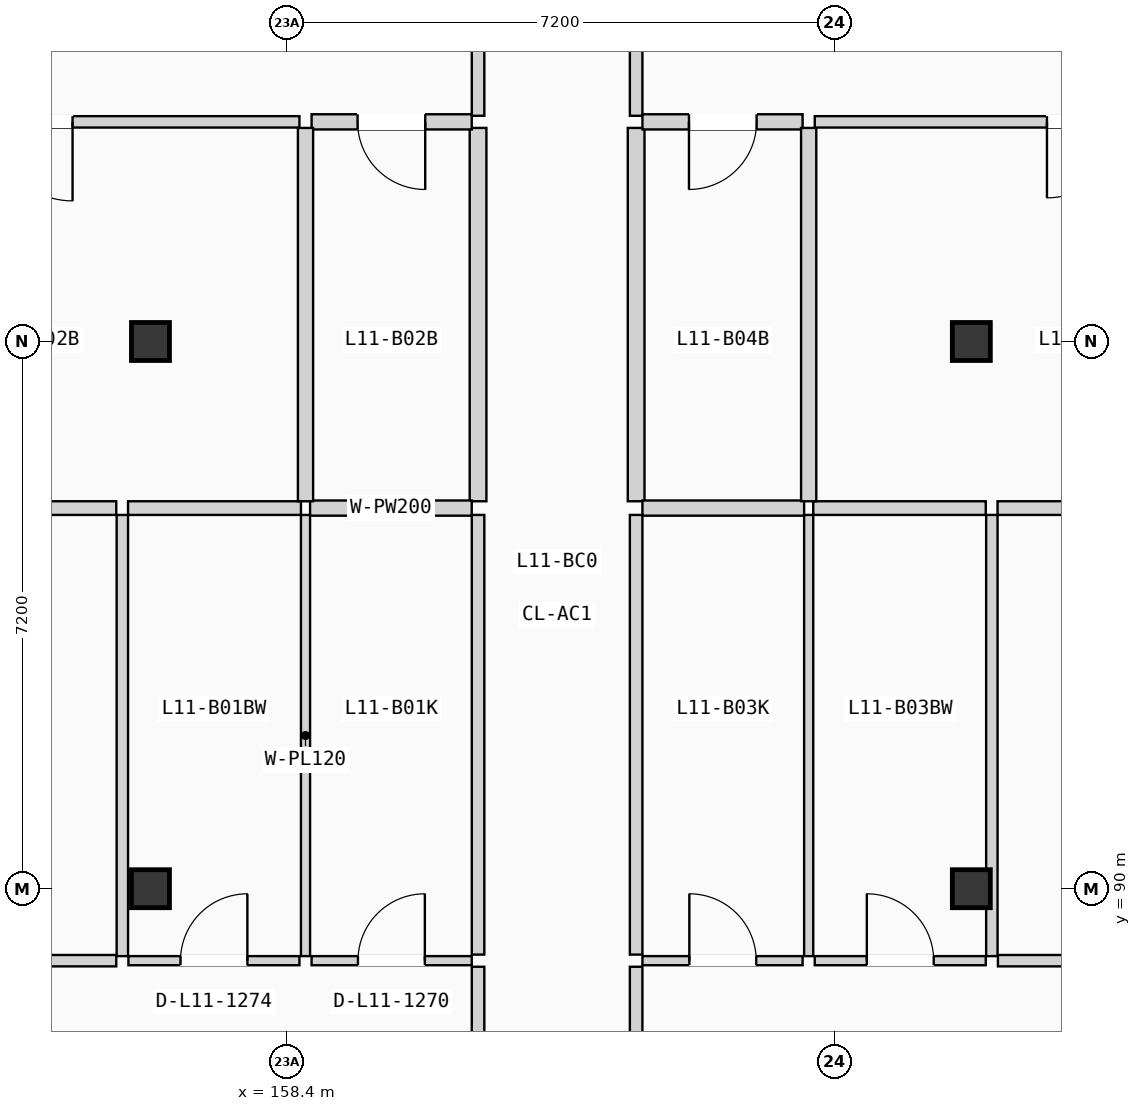
"""IFC4 building model, lengths in metres.
Left out: names, types, materials, properties, quantities, classifications, styles, units other than length and angle.
Written with IfcOpenShell. Run it as: python <this file> out.ifc"""

import sys

from ifc_helpers import new_model, si_unit, direction, frame, frame_2d, origin, origin_2d, place, context, subcontext, project, spatial, rectangle, extrude, element, fill, save


model = new_model("IFC4")
c1 = context("Model", 3, precision=1e-05, world=origin(), true_north=direction((0.0, 1.0)))
c2 = subcontext(c1, "Body", "Model", "MODEL_VIEW")
j1 = project(units=[si_unit("LENGTHUNIT", "METRE"), si_unit("PLANEANGLEUNIT", "RADIAN")], contexts=[c1])
p1 = place(None, origin())
s1 = spatial("IfcSite", under=j1, at=p1, CompositionType="ELEMENT")
p2 = place(p1, origin())
s2 = spatial("IfcBuilding", under=s1, at=p2, CompositionType="ELEMENT")
p3 = place(p2, frame((0.0, 0.0, 37.275)))
s3 = spatial("IfcBuildingStorey", under=s2, at=p3, CompositionType="ELEMENT", Elevation=37.275)
for number, where, z_axis, x_axis in (
    (1, (156.6, 90.0, 0.0), (0.0, 0.0, 1.0), (1.0, 0.0, 0.0)),
    (2, (156.6, 97.2, 0.0), (0.0, 0.0, 1.0), (1.0, 0.0, 0.0)),
    (3, (167.4, 90.0, 0.0), (0.0, 0.0, 1.0), (1.0, 0.0, 0.0)),
    (4, (167.4, 97.2, 0.0), (0.0, 0.0, 1.0), (1.0, 0.0, 0.0)),
):
    element("IfcColumn", number, at=place(p3, frame(where, z_axis=z_axis, x_axis=x_axis)), inside=s3, PredefinedType="COLUMN", context=c2, shape_type="SweptSolid", body=[
        extrude(rectangle(XDim=0.5, YDim=0.5, at=origin_2d()), origin(), (0.0, 0.0, 1.0), 3.15),
    ])
p4 = place(p3, frame((160.91, 81.945, 0.0), z_axis=(0.0, 0.0, 1.0), x_axis=(0.0, 1.0, 0.0)))
e5 = element("IfcWall", 5, at=p4, inside=s3, PredefinedType="PARTITIONING", context=c2, shape_type="SweptSolid", body=[
    extrude(rectangle(XDim=7.028, YDim=0.165, at=frame_2d((3.514, 0.0))), origin(), (0.0, 0.0, 1.0), 2.87),
])
p5 = place(p4, frame((3.024, 0.0, 0.0)))
e6 = element("IfcOpeningElement", 6, at=p5, cuts=e5, PredefinedType="OPENING", context=c2, shape_type="SweptSolid", body=[
    extrude(rectangle(XDim=0.98, YDim=2.08, at=frame_2d((0.49, 1.04))), frame((0.0, 0.093, 0.0), z_axis=(0.0, -1.0, 0.0), x_axis=(1.0, 0.0, 0.0)), (0.0, 0.0, 1.0), 0.185),
])
p6 = place(p3, frame((160.91, 89.133, 0.0), z_axis=(0.0, 0.0, 1.0), x_axis=(0.0, 1.0, 0.0)))
e7 = element("IfcWall", 7, at=p6, inside=s3, PredefinedType="PARTITIONING", context=c2, shape_type="SweptSolid", body=[
    extrude(rectangle(XDim=5.785, YDim=0.165, at=frame_2d((2.893, 0.0))), origin(), (0.0, 0.0, 1.0), 2.87),
])
p7 = place(p3, frame((160.91, 100.17, 0.0), z_axis=(0.0, 0.0, 1.0), x_axis=(0.0, 1.0, 0.0)))
e8 = element("IfcWall", 8, at=p7, inside=s3, PredefinedType="PARTITIONING", context=c2, shape_type="SweptSolid", body=[
    extrude(rectangle(XDim=5.958, YDim=0.165, at=frame_2d((2.979, 0.0))), origin(), (0.0, 0.0, 1.0), 2.87),
])
p8 = place(p7, frame((2.489, 0.0, 0.0)))
e9 = element("IfcOpeningElement", 9, at=p8, cuts=e8, PredefinedType="OPENING", context=c2, shape_type="SweptSolid", body=[
    extrude(rectangle(XDim=0.98, YDim=2.08, at=frame_2d((0.49, 1.04))), frame((0.0, 0.093, 0.0), z_axis=(0.0, -1.0, 0.0), x_axis=(1.0, 0.0, 0.0)), (0.0, 0.0, 1.0), 0.185),
])
p9 = place(p3, frame((160.91, 95.098, 0.0), z_axis=(0.0, 0.0, 1.0), x_axis=(0.0, 1.0, 0.0)))
e10 = element("IfcWall", 10, at=p9, inside=s3, PredefinedType="PLUMBINGWALL", context=c2, shape_type="SweptSolid", body=[
    extrude(rectangle(XDim=4.912, YDim=0.22, at=frame_2d((2.456, 0.0))), origin(), (0.0, 0.0, 1.0), 2.87),
])
p10 = place(p3, frame((162.99, 81.945, 0.0), z_axis=(0.0, 0.0, 1.0), x_axis=(0.0, 1.0, 0.0)))
e11 = element("IfcWall", 11, at=p10, inside=s3, PredefinedType="PARTITIONING", context=c2, shape_type="SweptSolid", body=[
    extrude(rectangle(XDim=7.028, YDim=0.165, at=frame_2d((3.514, 0.0))), origin(), (0.0, 0.0, 1.0), 2.87),
])
p11 = place(p10, frame((3.024, 0.0, 0.0)))
e12 = element("IfcOpeningElement", 12, at=p11, cuts=e11, PredefinedType="OPENING", context=c2, shape_type="SweptSolid", body=[
    extrude(rectangle(XDim=0.98, YDim=2.08, at=frame_2d((0.49, 1.04))), frame((0.0, 0.093, 0.0), z_axis=(0.0, -1.0, 0.0), x_axis=(1.0, 0.0, 0.0)), (0.0, 0.0, 1.0), 0.185),
])
p12 = place(p3, frame((162.99, 89.133, 0.0), z_axis=(0.0, 0.0, 1.0), x_axis=(0.0, 1.0, 0.0)))
e13 = element("IfcWall", 13, at=p12, inside=s3, PredefinedType="PARTITIONING", context=c2, shape_type="SweptSolid", body=[
    extrude(rectangle(XDim=5.785, YDim=0.165, at=frame_2d((2.893, 0.0))), origin(), (0.0, 0.0, 1.0), 2.87),
])
p13 = place(p3, frame((162.99, 100.17, 0.0), z_axis=(0.0, 0.0, 1.0), x_axis=(0.0, 1.0, 0.0)))
e14 = element("IfcWall", 14, at=p13, inside=s3, PredefinedType="PARTITIONING", context=c2, shape_type="SweptSolid", body=[
    extrude(rectangle(XDim=5.958, YDim=0.165, at=frame_2d((2.979, 0.0))), origin(), (0.0, 0.0, 1.0), 2.87),
])
p14 = place(p13, frame((2.489, 0.0, 0.0)))
e15 = element("IfcOpeningElement", 15, at=p14, cuts=e14, PredefinedType="OPENING", context=c2, shape_type="SweptSolid", body=[
    extrude(rectangle(XDim=0.98, YDim=2.08, at=frame_2d((0.49, 1.04))), frame((0.0, 0.093, 0.0), z_axis=(0.0, -1.0, 0.0), x_axis=(1.0, 0.0, 0.0)), (0.0, 0.0, 1.0), 0.185),
])
p15 = place(p3, frame((162.99, 95.098, 0.0), z_axis=(0.0, 0.0, 1.0), x_axis=(0.0, 1.0, 0.0)))
e16 = element("IfcWall", 16, at=p15, inside=s3, PredefinedType="PLUMBINGWALL", context=c2, shape_type="SweptSolid", body=[
    extrude(rectangle(XDim=4.912, YDim=0.22, at=frame_2d((2.456, 0.0))), origin(), (0.0, 0.0, 1.0), 2.87),
])
p16 = place(p3, frame((158.72, 89.053, 0.0), z_axis=(0.0, 0.0, 1.0), x_axis=(1.0, 0.0, 0.0)))
e17 = element("IfcWall", 17, at=p16, inside=s3, PredefinedType="PARTITIONING", context=c2, shape_type="SweptSolid", body=[
    extrude(rectangle(XDim=2.107, YDim=0.12, at=frame_2d((1.053, 0.0))), origin(), (0.0, 0.0, 1.0), 2.87),
])
p17 = place(p16, frame((0.61, 0.0, 0.0)))
e18 = element("IfcOpeningElement", 18, at=p17, cuts=e17, PredefinedType="OPENING", context=c2, shape_type="SweptSolid", body=[
    extrude(rectangle(XDim=0.88, YDim=2.02, at=frame_2d((0.44, 1.01))), frame((0.0, 0.07, 0.0), z_axis=(0.0, -1.0, 0.0), x_axis=(1.0, 0.0, 0.0)), (0.0, 0.0, 1.0), 0.14),
])
p18 = place(p3, frame((151.54, 89.053, 0.0), z_axis=(0.0, 0.0, 1.0), x_axis=(1.0, 0.0, 0.0)))
e19 = element("IfcWall", 19, at=p18, inside=s3, PredefinedType="PARTITIONING", context=c2, shape_type="SweptSolid", body=[
    extrude(rectangle(XDim=4.61, YDim=0.15, at=frame_2d((2.305, 0.0))), origin(), (0.0, 0.0, 1.0), 2.87),
])
p19 = place(p18, frame((1.84, 0.0, 0.0)))
e20 = element("IfcOpeningElement", 20, at=p19, cuts=e19, PredefinedType="OPENING", context=c2, shape_type="SweptSolid", body=[
    extrude(rectangle(XDim=0.94, YDim=2.06, at=frame_2d((0.47, 1.03))), frame((0.0, 0.085, 0.0), z_axis=(0.0, -1.0, 0.0), x_axis=(1.0, 0.0, 0.0)), (0.0, 0.0, 1.0), 0.17),
])
p20 = place(p3, frame((156.31, 89.053, 0.0), z_axis=(0.0, 0.0, 1.0), x_axis=(1.0, 0.0, 0.0)))
e21 = element("IfcWall", 21, at=p20, inside=s3, PredefinedType="PARTITIONING", context=c2, shape_type="SweptSolid", body=[
    extrude(rectangle(XDim=2.25, YDim=0.12, at=frame_2d((1.125, 0.0))), origin(), (0.0, 0.0, 1.0), 2.87),
])
p21 = place(p20, frame((0.685, 0.0, 0.0)))
e22 = element("IfcOpeningElement", 22, at=p21, cuts=e21, PredefinedType="OPENING", context=c2, shape_type="SweptSolid", body=[
    extrude(rectangle(XDim=0.88, YDim=2.02, at=frame_2d((0.44, 1.01))), frame((0.0, 0.07, 0.0), z_axis=(0.0, -1.0, 0.0), x_axis=(1.0, 0.0, 0.0)), (0.0, 0.0, 1.0), 0.14),
])
p22 = place(p3, frame((158.64, 89.113, 0.0), z_axis=(0.0, 0.0, 1.0), x_axis=(0.0, 1.0, 0.0)))
e23 = element("IfcWall", 23, at=p22, inside=s3, PredefinedType="PARTITIONING", context=c2, shape_type="SweptSolid", body=[
    extrude(rectangle(XDim=5.805, YDim=0.12, at=frame_2d((2.902, 0.0))), origin(), (0.0, 0.0, 1.0), 2.87),
])
p23 = place(p3, frame((158.7, 95.008, 0.0), z_axis=(0.0, 0.0, 1.0), x_axis=(1.0, 0.0, 0.0)))
e24 = element("IfcWall", 24, at=p23, inside=s3, PredefinedType="PLUMBINGWALL", context=c2, shape_type="SweptSolid", body=[
    extrude(rectangle(XDim=2.127, YDim=0.2, at=frame_2d((1.063, 0.0))), origin(), (0.0, 0.0, 1.0), 2.87),
])
p24 = place(p3, frame((156.23, 89.113, 0.0), z_axis=(0.0, 0.0, 1.0), x_axis=(0.0, 1.0, 0.0)))
e25 = element("IfcWall", 25, at=p24, inside=s3, PredefinedType="PARTITIONING", context=c2, shape_type="SweptSolid", body=[
    extrude(rectangle(XDim=5.805, YDim=0.15, at=frame_2d((2.902, 0.0))), origin(), (0.0, 0.0, 1.0), 2.87),
])
p25 = place(p3, frame((151.54, 95.008, 0.0), z_axis=(0.0, 0.0, 1.0), x_axis=(1.0, 0.0, 0.0)))
e26 = element("IfcWall", 26, at=p25, inside=s3, PredefinedType="PARTITIONING", context=c2, shape_type="SweptSolid", body=[
    extrude(rectangle(XDim=4.61, YDim=0.18, at=frame_2d((2.305, 0.0))), origin(), (0.0, 0.0, 1.0), 2.87),
])
p26 = place(p3, frame((156.305, 95.008, 0.0), z_axis=(0.0, 0.0, 1.0), x_axis=(1.0, 0.0, 0.0)))
e27 = element("IfcWall", 27, at=p26, inside=s3, PredefinedType="PARTITIONING", context=c2, shape_type="SweptSolid", body=[
    extrude(rectangle(XDim=2.275, YDim=0.18, at=frame_2d((1.138, 0.0))), origin(), (0.0, 0.0, 1.0), 2.87),
])
p27 = place(p3, frame((158.72, 100.09, 0.0), z_axis=(0.0, 0.0, 1.0), x_axis=(1.0, 0.0, 0.0)))
e28 = element("IfcWall", 28, at=p27, inside=s3, PredefinedType="PLUMBINGWALL", context=c2, shape_type="SweptSolid", body=[
    extrude(rectangle(XDim=2.107, YDim=0.2, at=frame_2d((1.053, 0.0))), origin(), (0.0, 0.0, 1.0), 2.87),
])
p28 = place(p27, frame((0.605, 0.0, 0.0)))
e29 = element("IfcOpeningElement", 29, at=p28, cuts=e28, PredefinedType="OPENING", context=c2, shape_type="SweptSolid", body=[
    extrude(rectangle(XDim=0.89, YDim=2.03, at=frame_2d((0.445, 1.015))), frame((0.0, 0.11, 0.0), z_axis=(0.0, -1.0, 0.0), x_axis=(1.0, 0.0, 0.0)), (0.0, 0.0, 1.0), 0.22),
])
p29 = place(p3, frame((151.54, 100.09, 0.0), z_axis=(0.0, 0.0, 1.0), x_axis=(1.0, 0.0, 0.0)))
e30 = element("IfcWall", 30, at=p29, inside=s3, PredefinedType="PARTITIONING", context=c2, shape_type="SweptSolid", body=[
    extrude(rectangle(XDim=7.02, YDim=0.15, at=frame_2d((3.51, 0.0))), origin(), (0.0, 0.0, 1.0), 2.87),
])
p30 = place(p29, frame((2.995, 0.0, 0.0)))
e31 = element("IfcOpeningElement", 31, at=p30, cuts=e30, PredefinedType="OPENING", context=c2, shape_type="SweptSolid", body=[
    extrude(rectangle(XDim=1.04, YDim=2.08, at=frame_2d((0.52, 1.04))), frame((0.0, 0.085, 0.0), z_axis=(0.0, -1.0, 0.0), x_axis=(1.0, 0.0, 0.0)), (0.0, 0.0, 1.0), 0.17),
])
p31 = place(p3, frame((158.64, 95.098, 0.0), z_axis=(0.0, 0.0, 1.0), x_axis=(0.0, 1.0, 0.0)))
e32 = element("IfcWall", 32, at=p31, inside=s3, PredefinedType="PLUMBINGWALL", context=c2, shape_type="SweptSolid", body=[
    extrude(rectangle(XDim=4.912, YDim=0.2, at=frame_2d((2.456, 0.0))), origin(), (0.0, 0.0, 1.0), 2.87),
])
p32 = place(p3, frame((163.073, 89.053, 0.0), z_axis=(0.0, 0.0, 1.0), x_axis=(1.0, 0.0, 0.0)))
e33 = element("IfcWall", 33, at=p32, inside=s3, PredefinedType="PARTITIONING", context=c2, shape_type="SweptSolid", body=[
    extrude(rectangle(XDim=2.107, YDim=0.12, at=frame_2d((1.053, 0.0))), origin(), (0.0, 0.0, 1.0), 2.87),
])
p33 = place(p32, frame((0.617, 0.0, 0.0)))
e34 = element("IfcOpeningElement", 34, at=p33, cuts=e33, PredefinedType="OPENING", context=c2, shape_type="SweptSolid", body=[
    extrude(rectangle(XDim=0.88, YDim=2.02, at=frame_2d((0.44, 1.01))), frame((0.0, 0.07, 0.0), z_axis=(0.0, -1.0, 0.0), x_axis=(1.0, 0.0, 0.0)), (0.0, 0.0, 1.0), 0.14),
])
p34 = place(p3, frame((167.75, 89.053, 0.0), z_axis=(0.0, 0.0, 1.0), x_axis=(1.0, 0.0, 0.0)))
e35 = element("IfcWall", 35, at=p34, inside=s3, PredefinedType="PARTITIONING", context=c2, shape_type="SweptSolid", body=[
    extrude(rectangle(XDim=4.71, YDim=0.15, at=frame_2d((2.355, 0.0))), origin(), (0.0, 0.0, 1.0), 2.87),
])
p35 = place(p34, frame((1.9, 0.0, 0.0)))
e36 = element("IfcOpeningElement", 36, at=p35, cuts=e35, PredefinedType="OPENING", context=c2, shape_type="SweptSolid", body=[
    extrude(rectangle(XDim=0.9, YDim=2.04, at=frame_2d((0.45, 1.02))), frame((0.0, 0.085, 0.0), z_axis=(0.0, -1.0, 0.0), x_axis=(1.0, 0.0, 0.0)), (0.0, 0.0, 1.0), 0.17),
])
p36 = place(p3, frame((165.34, 89.053, 0.0), z_axis=(0.0, 0.0, 1.0), x_axis=(1.0, 0.0, 0.0)))
e37 = element("IfcWall", 37, at=p36, inside=s3, PredefinedType="PARTITIONING", context=c2, shape_type="SweptSolid", body=[
    extrude(rectangle(XDim=2.25, YDim=0.12, at=frame_2d((1.125, 0.0))), origin(), (0.0, 0.0, 1.0), 2.87),
])
p37 = place(p36, frame((0.685, 0.0, 0.0)))
e38 = element("IfcOpeningElement", 38, at=p37, cuts=e37, PredefinedType="OPENING", context=c2, shape_type="SweptSolid", body=[
    extrude(rectangle(XDim=0.88, YDim=2.02, at=frame_2d((0.44, 1.01))), frame((0.0, 0.07, 0.0), z_axis=(0.0, -1.0, 0.0), x_axis=(1.0, 0.0, 0.0)), (0.0, 0.0, 1.0), 0.14),
])
p38 = place(p3, frame((165.26, 89.113, 0.0), z_axis=(0.0, 0.0, 1.0), x_axis=(0.0, 1.0, 0.0)))
e39 = element("IfcWall", 39, at=p38, inside=s3, PredefinedType="PARTITIONING", context=c2, shape_type="SweptSolid", body=[
    extrude(rectangle(XDim=5.805, YDim=0.12, at=frame_2d((2.902, 0.0))), origin(), (0.0, 0.0, 1.0), 2.87),
])
p39 = place(p3, frame((163.073, 95.008, 0.0), z_axis=(0.0, 0.0, 1.0), x_axis=(1.0, 0.0, 0.0)))
e40 = element("IfcWall", 40, at=p39, inside=s3, PredefinedType="PLUMBINGWALL", context=c2, shape_type="SweptSolid", body=[
    extrude(rectangle(XDim=2.127, YDim=0.2, at=frame_2d((1.063, 0.0))), origin(), (0.0, 0.0, 1.0), 2.87),
])
p40 = place(p3, frame((167.67, 89.113, 0.0), z_axis=(0.0, 0.0, 1.0), x_axis=(0.0, 1.0, 0.0)))
e41 = element("IfcWall", 41, at=p40, inside=s3, PredefinedType="PARTITIONING", context=c2, shape_type="SweptSolid", body=[
    extrude(rectangle(XDim=5.805, YDim=0.15, at=frame_2d((2.902, 0.0))), origin(), (0.0, 0.0, 1.0), 2.87),
])
p41 = place(p3, frame((167.745, 95.008, 0.0), z_axis=(0.0, 0.0, 1.0), x_axis=(1.0, 0.0, 0.0)))
e42 = element("IfcWall", 42, at=p41, inside=s3, PredefinedType="PARTITIONING", context=c2, shape_type="SweptSolid", body=[
    extrude(rectangle(XDim=4.715, YDim=0.18, at=frame_2d((2.357, 0.0))), origin(), (0.0, 0.0, 1.0), 2.87),
])
p42 = place(p3, frame((165.32, 95.008, 0.0), z_axis=(0.0, 0.0, 1.0), x_axis=(1.0, 0.0, 0.0)))
e43 = element("IfcWall", 43, at=p42, inside=s3, PredefinedType="PARTITIONING", context=c2, shape_type="SweptSolid", body=[
    extrude(rectangle(XDim=2.27, YDim=0.18, at=frame_2d((1.135, 0.0))), origin(), (0.0, 0.0, 1.0), 2.87),
])
p43 = place(p3, frame((163.073, 100.09, 0.0), z_axis=(0.0, 0.0, 1.0), x_axis=(1.0, 0.0, 0.0)))
e44 = element("IfcWall", 44, at=p43, inside=s3, PredefinedType="PLUMBINGWALL", context=c2, shape_type="SweptSolid", body=[
    extrude(rectangle(XDim=2.107, YDim=0.2, at=frame_2d((1.053, 0.0))), origin(), (0.0, 0.0, 1.0), 2.87),
])
p44 = place(p43, frame((0.612, 0.0, 0.0)))
e45 = element("IfcOpeningElement", 45, at=p44, cuts=e44, PredefinedType="OPENING", context=c2, shape_type="SweptSolid", body=[
    extrude(rectangle(XDim=0.89, YDim=2.03, at=frame_2d((0.445, 1.015))), frame((0.0, 0.11, 0.0), z_axis=(0.0, -1.0, 0.0), x_axis=(1.0, 0.0, 0.0)), (0.0, 0.0, 1.0), 0.22),
])
p45 = place(p3, frame((165.34, 100.09, 0.0), z_axis=(0.0, 0.0, 1.0), x_axis=(1.0, 0.0, 0.0)))
e46 = element("IfcWall", 46, at=p45, inside=s3, PredefinedType="PARTITIONING", context=c2, shape_type="SweptSolid", body=[
    extrude(rectangle(XDim=7.12, YDim=0.15, at=frame_2d((3.56, 0.0))), origin(), (0.0, 0.0, 1.0), 2.87),
])
p46 = place(p45, frame((3.055, 0.0, 0.0)))
e47 = element("IfcOpeningElement", 47, at=p46, cuts=e46, PredefinedType="OPENING", context=c2, shape_type="SweptSolid", body=[
    extrude(rectangle(XDim=1.0, YDim=2.06, at=frame_2d((0.5, 1.03))), frame((0.0, 0.085, 0.0), z_axis=(0.0, -1.0, 0.0), x_axis=(1.0, 0.0, 0.0)), (0.0, 0.0, 1.0), 0.17),
])
p47 = place(p3, frame((165.26, 95.098, 0.0), z_axis=(0.0, 0.0, 1.0), x_axis=(0.0, 1.0, 0.0)))
e48 = element("IfcWall", 48, at=p47, inside=s3, PredefinedType="PLUMBINGWALL", context=c2, shape_type="SweptSolid", body=[
    extrude(rectangle(XDim=4.912, YDim=0.2, at=frame_2d((2.456, 0.0))), origin(), (0.0, 0.0, 1.0), 2.87),
])
p48 = place(p17, origin())
e49 = element("IfcDoor", 49, at=p48, inside=s3, OperationType="SINGLE_SWING_RIGHT", PredefinedType="DOOR", context=c2, shape_type="SweptSolid", body=[
    extrude(rectangle(XDim=0.88, YDim=2.02, at=frame_2d((0.44, 1.01))), frame((0.0, 0.025, 0.0), z_axis=(0.0, -1.0, 0.0), x_axis=(1.0, 0.0, 0.0)), (0.0, 0.0, 1.0), 0.05),
])
fill(e18, e49)
p49 = place(p21, origin())
e50 = element("IfcDoor", 50, at=p49, inside=s3, OperationType="SINGLE_SWING_RIGHT", PredefinedType="DOOR", context=c2, shape_type="SweptSolid", body=[
    extrude(rectangle(XDim=0.88, YDim=2.02, at=frame_2d((0.44, 1.01))), frame((0.0, 0.025, 0.0), z_axis=(0.0, -1.0, 0.0), x_axis=(1.0, 0.0, 0.0)), (0.0, 0.0, 1.0), 0.05),
])
fill(e22, e50)
p50 = place(p28, frame((0.89, 0.0, 0.0), z_axis=(0.0, 0.0, 1.0), x_axis=(-1.0, 0.0, 0.0)))
e51 = element("IfcDoor", 51, at=p50, inside=s3, OperationType="SINGLE_SWING_RIGHT", PredefinedType="DOOR", context=c2, shape_type="SweptSolid", body=[
    extrude(rectangle(XDim=0.89, YDim=2.03, at=frame_2d((0.445, 1.015))), frame((0.0, 0.025, 0.0), z_axis=(0.0, -1.0, 0.0), x_axis=(1.0, 0.0, 0.0)), (0.0, 0.0, 1.0), 0.05),
])
fill(e29, e51)
p51 = place(p30, frame((1.04, 0.0, 0.0), z_axis=(0.0, 0.0, 1.0), x_axis=(-1.0, 0.0, 0.0)))
e52 = element("IfcDoor", 52, at=p51, inside=s3, OperationType="SINGLE_SWING_RIGHT", PredefinedType="DOOR", context=c2, shape_type="SweptSolid", body=[
    extrude(rectangle(XDim=1.04, YDim=2.08, at=frame_2d((0.52, 1.04))), frame((0.0, 0.025, 0.0), z_axis=(0.0, -1.0, 0.0), x_axis=(1.0, 0.0, 0.0)), (0.0, 0.0, 1.0), 0.05),
])
fill(e31, e52)
p52 = place(p33, origin())
e53 = element("IfcDoor", 53, at=p52, inside=s3, OperationType="SINGLE_SWING_LEFT", PredefinedType="DOOR", context=c2, shape_type="SweptSolid", body=[
    extrude(rectangle(XDim=0.88, YDim=2.02, at=frame_2d((0.44, 1.01))), frame((0.0, 0.025, 0.0), z_axis=(0.0, -1.0, 0.0), x_axis=(1.0, 0.0, 0.0)), (0.0, 0.0, 1.0), 0.05),
])
fill(e34, e53)
p53 = place(p37, origin())
e54 = element("IfcDoor", 54, at=p53, inside=s3, OperationType="SINGLE_SWING_LEFT", PredefinedType="DOOR", context=c2, shape_type="SweptSolid", body=[
    extrude(rectangle(XDim=0.88, YDim=2.02, at=frame_2d((0.44, 1.01))), frame((0.0, 0.025, 0.0), z_axis=(0.0, -1.0, 0.0), x_axis=(1.0, 0.0, 0.0)), (0.0, 0.0, 1.0), 0.05),
])
fill(e38, e54)
p54 = place(p44, frame((0.89, 0.0, 0.0), z_axis=(0.0, 0.0, 1.0), x_axis=(-1.0, 0.0, 0.0)))
e55 = element("IfcDoor", 55, at=p54, inside=s3, OperationType="SINGLE_SWING_LEFT", PredefinedType="DOOR", context=c2, shape_type="SweptSolid", body=[
    extrude(rectangle(XDim=0.89, YDim=2.03, at=frame_2d((0.445, 1.015))), frame((0.0, 0.025, 0.0), z_axis=(0.0, -1.0, 0.0), x_axis=(1.0, 0.0, 0.0)), (0.0, 0.0, 1.0), 0.05),
])
fill(e45, e55)
p55 = place(p46, frame((1.0, 0.0, 0.0), z_axis=(0.0, 0.0, 1.0), x_axis=(-1.0, 0.0, 0.0)))
e56 = element("IfcDoor", 56, at=p55, inside=s3, OperationType="SINGLE_SWING_LEFT", PredefinedType="DOOR", context=c2, shape_type="SweptSolid", body=[
    extrude(rectangle(XDim=1.0, YDim=2.06, at=frame_2d((0.5, 1.03))), frame((0.0, 0.025, 0.0), z_axis=(0.0, -1.0, 0.0), x_axis=(1.0, 0.0, 0.0)), (0.0, 0.0, 1.0), 0.05),
])
fill(e47, e56)
save(model, sys.argv[1])
